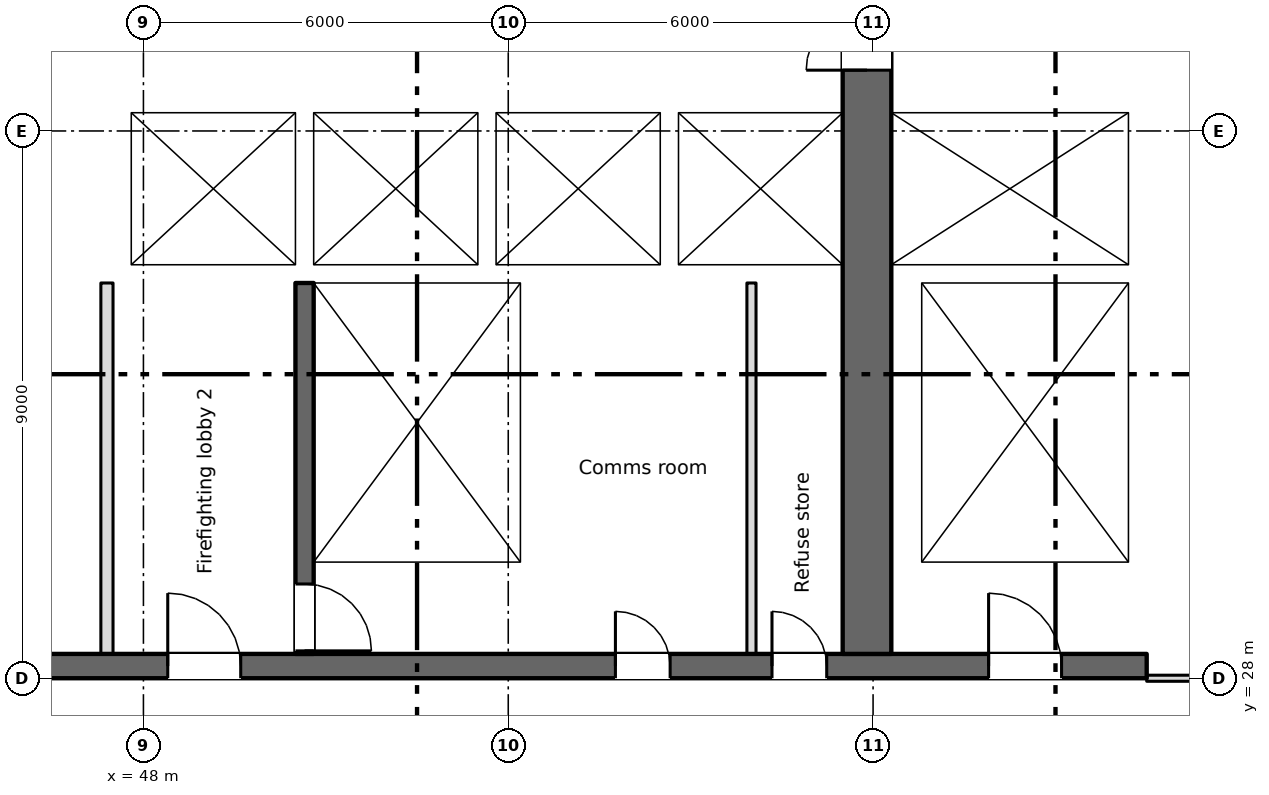
"""IFC4 building model, lengths in metres.
Left out: names, types, materials, properties, quantities, classifications, styles, units other than length and angle.
Written with IfcOpenShell. Run it as: python <this file> out.ifc"""

import sys

from ifc_helpers import new_model, si_unit, direction, frame, frame_2d, origin, place, context, subcontext, project, spatial, rectangle, extrude, element, fill, save


model = new_model("IFC4")
c1 = context("Model", 3, precision=1e-05, world=origin(), true_north=direction((0.0, 1.0)))
c2 = subcontext(c1, "Body", "Model", "MODEL_VIEW")
j1 = project(units=[si_unit("LENGTHUNIT", "METRE"), si_unit("PLANEANGLEUNIT", "RADIAN")], contexts=[c1])
p1 = place(None, origin())
s1 = spatial("IfcSite", under=j1, at=p1, CompositionType="ELEMENT")
p2 = place(p1, origin())
s2 = spatial("IfcBuilding", under=s1, at=p2, CompositionType="ELEMENT")
p3 = place(p2, frame((0.0, 0.0, 125.0)))
s3 = spatial("IfcBuildingStorey", under=s2, at=p3, CompositionType="ELEMENT", Elevation=125.0)
p4 = place(p3, frame((6.7, 28.2, 0.0), z_axis=(0.0, 0.0, 1.0), x_axis=(1.0, 0.0, 0.0)))
e1 = element("IfcWall", 1, at=p4, inside=s3, PredefinedType="SHEAR", context=c2, shape_type="SweptSolid", body=[
    extrude(rectangle(XDim=57.8, YDim=0.4, at=frame_2d((28.9, 0.0))), origin(), (0.0, 0.0, 1.0), 3.35),
])
p5 = place(p4, frame((12.062, 0.0, 0.0)))
e2 = element("IfcOpeningElement", 2, at=p5, cuts=e1, PredefinedType="OPENING", context=c2, shape_type="SweptSolid", body=[
    extrude(rectangle(XDim=0.9, YDim=2.1, at=frame_2d((0.45, 1.05))), frame((0.0, 0.21, 0.0), z_axis=(0.0, -1.0, 0.0), x_axis=(1.0, 0.0, 0.0)), (0.0, 0.0, 1.0), 0.42),
])
p6 = place(p4, frame((14.637, 0.0, 0.0)))
e3 = element("IfcOpeningElement", 3, at=p6, cuts=e1, PredefinedType="OPENING", context=c2, shape_type="SweptSolid", body=[
    extrude(rectangle(XDim=0.9, YDim=2.1, at=frame_2d((0.45, 1.05))), frame((0.0, 0.21, 0.0), z_axis=(0.0, -1.0, 0.0), x_axis=(1.0, 0.0, 0.0)), (0.0, 0.0, 1.0), 0.42),
])
p7 = place(p4, frame((49.062, 0.0, 0.0)))
e4 = element("IfcOpeningElement", 4, at=p7, cuts=e1, PredefinedType="OPENING", context=c2, shape_type="SweptSolid", body=[
    extrude(rectangle(XDim=0.9, YDim=2.1, at=frame_2d((0.45, 1.05))), frame((0.0, 0.21, 0.0), z_axis=(0.0, -1.0, 0.0), x_axis=(1.0, 0.0, 0.0)), (0.0, 0.0, 1.0), 0.42),
])
p8 = place(p4, frame((51.637, 0.0, 0.0)))
e5 = element("IfcOpeningElement", 5, at=p8, cuts=e1, PredefinedType="OPENING", context=c2, shape_type="SweptSolid", body=[
    extrude(rectangle(XDim=0.9, YDim=2.1, at=frame_2d((0.45, 1.05))), frame((0.0, 0.21, 0.0), z_axis=(0.0, -1.0, 0.0), x_axis=(1.0, 0.0, 0.0)), (0.0, 0.0, 1.0), 0.42),
])
p9 = place(p4, frame((1.35, 0.0, 0.0)))
e6 = element("IfcOpeningElement", 6, at=p9, cuts=e1, PredefinedType="OPENING", context=c2, shape_type="SweptSolid", body=[
    extrude(rectangle(XDim=0.9, YDim=2.1, at=frame_2d((0.45, 1.05))), frame((0.0, 0.21, 0.0), z_axis=(0.0, -1.0, 0.0), x_axis=(1.0, 0.0, 0.0)), (0.0, 0.0, 1.0), 0.42),
])
p10 = place(p4, frame((4.7, 0.0, 0.0)))
e7 = element("IfcOpeningElement", 7, at=p10, cuts=e1, PredefinedType="OPENING", context=c2, shape_type="SweptSolid", body=[
    extrude(rectangle(XDim=1.2, YDim=2.1, at=frame_2d((0.6, 1.05))), frame((0.0, 0.21, 0.0), z_axis=(0.0, -1.0, 0.0), x_axis=(1.0, 0.0, 0.0)), (0.0, 0.0, 1.0), 0.42),
])
p11 = place(p4, frame((31.7, 0.0, 0.0)))
e8 = element("IfcOpeningElement", 8, at=p11, cuts=e1, PredefinedType="OPENING", context=c2, shape_type="SweptSolid", body=[
    extrude(rectangle(XDim=1.2, YDim=2.1, at=frame_2d((0.6, 1.05))), frame((0.0, 0.21, 0.0), z_axis=(0.0, -1.0, 0.0), x_axis=(1.0, 0.0, 0.0)), (0.0, 0.0, 1.0), 0.42),
])
p12 = place(p4, frame((55.2, 0.0, 0.0)))
e9 = element("IfcOpeningElement", 9, at=p12, cuts=e1, PredefinedType="OPENING", context=c2, shape_type="SweptSolid", body=[
    extrude(rectangle(XDim=1.2, YDim=2.1, at=frame_2d((0.6, 1.05))), frame((0.0, 0.21, 0.0), z_axis=(0.0, -1.0, 0.0), x_axis=(1.0, 0.0, 0.0)), (0.0, 0.0, 1.0), 0.42),
])
p13 = place(p4, frame((21.7, 0.0, 0.0)))
e10 = element("IfcOpeningElement", 10, at=p13, cuts=e1, PredefinedType="OPENING", context=c2, shape_type="SweptSolid", body=[
    extrude(rectangle(XDim=1.2, YDim=2.1, at=frame_2d((0.6, 1.05))), frame((0.0, 0.21, 0.0), z_axis=(0.0, -1.0, 0.0), x_axis=(1.0, 0.0, 0.0)), (0.0, 0.0, 1.0), 0.42),
])
p14 = place(p4, frame((41.7, 0.0, 0.0)))
e11 = element("IfcOpeningElement", 11, at=p14, cuts=e1, PredefinedType="OPENING", context=c2, shape_type="SweptSolid", body=[
    extrude(rectangle(XDim=1.2, YDim=2.1, at=frame_2d((0.6, 1.05))), frame((0.0, 0.21, 0.0), z_axis=(0.0, -1.0, 0.0), x_axis=(1.0, 0.0, 0.0)), (0.0, 0.0, 1.0), 0.42),
])
p15 = place(p4, frame((24.85, 0.0, 0.0)))
e12 = element("IfcOpeningElement", 12, at=p15, cuts=e1, PredefinedType="OPENING", context=c2, shape_type="SweptSolid", body=[
    extrude(rectangle(XDim=2.4, YDim=2.1, at=frame_2d((1.2, 1.05))), frame((0.0, 0.21, 0.0), z_axis=(0.0, -1.0, 0.0), x_axis=(1.0, 0.0, 0.0)), (0.0, 0.0, 1.0), 0.42),
])
p16 = place(p4, frame((37.35, 0.0, 0.0)))
e13 = element("IfcOpeningElement", 13, at=p16, cuts=e1, PredefinedType="OPENING", context=c2, shape_type="SweptSolid", body=[
    extrude(rectangle(XDim=2.4, YDim=2.1, at=frame_2d((1.2, 1.05))), frame((0.0, 0.21, 0.0), z_axis=(0.0, -1.0, 0.0), x_axis=(1.0, 0.0, 0.0)), (0.0, 0.0, 1.0), 0.42),
])
p17 = place(p4, frame((7.95, 0.0, 0.0)))
e14 = element("IfcOpeningElement", 14, at=p17, cuts=e1, PredefinedType="OPENING", context=c2, shape_type="SweptSolid", body=[
    extrude(rectangle(XDim=2.4, YDim=2.1, at=frame_2d((1.2, 1.05))), frame((0.0, 0.21, 0.0), z_axis=(0.0, -1.0, 0.0), x_axis=(1.0, 0.0, 0.0)), (0.0, 0.0, 1.0), 0.42),
])
p18 = place(p4, frame((28.85, 0.0, 0.0)))
e15 = element("IfcOpeningElement", 15, at=p18, cuts=e1, PredefinedType="OPENING", context=c2, shape_type="SweptSolid", body=[
    extrude(rectangle(XDim=0.9, YDim=2.1, at=frame_2d((0.45, 1.05))), frame((0.0, 0.21, 0.0), z_axis=(0.0, -1.0, 0.0), x_axis=(1.0, 0.0, 0.0)), (0.0, 0.0, 1.0), 0.42),
])
p19 = place(p4, frame((34.85, 0.0, 0.0)))
e16 = element("IfcOpeningElement", 16, at=p19, cuts=e1, PredefinedType="OPENING", context=c2, shape_type="SweptSolid", body=[
    extrude(rectangle(XDim=0.9, YDim=2.1, at=frame_2d((0.45, 1.05))), frame((0.0, 0.21, 0.0), z_axis=(0.0, -1.0, 0.0), x_axis=(1.0, 0.0, 0.0)), (0.0, 0.0, 1.0), 0.42),
])
p20 = place(p3, frame((64.35, 34.8, 0.0), z_axis=(0.0, 0.0, 1.0), x_axis=(0.0, 1.0, 0.0)))
e17 = element("IfcWall", 17, at=p20, inside=s3, PredefinedType="SHEAR", context=c2, shape_type="SweptSolid", body=[
    extrude(rectangle(XDim=10.4, YDim=0.3, at=frame_2d((5.2, 0.0))), origin(), (0.0, 0.0, 1.0), 3.35),
])
p21 = place(p3, frame((59.9, 28.4, 0.0), z_axis=(0.0, 0.0, 1.0), x_axis=(0.0, 1.0, 0.0)))
e18 = element("IfcWall", 18, at=p21, inside=s3, PredefinedType="SHEAR", context=c2, shape_type="SweptSolid", body=[
    extrude(rectangle(XDim=16.8, YDim=0.8, at=frame_2d((8.4, 0.0))), origin(), (0.0, 0.0, 1.0), 3.35),
])
p22 = place(p21, frame((9.6, 0.0, 0.0)))
e19 = element("IfcOpeningElement", 19, at=p22, cuts=e18, PredefinedType="OPENING", context=c2, shape_type="SweptSolid", body=[
    extrude(rectangle(XDim=2.0, YDim=2.1, at=frame_2d((1.0, 1.05))), frame((0.0, 0.41, 0.0), z_axis=(0.0, -1.0, 0.0), x_axis=(1.0, 0.0, 0.0)), (0.0, 0.0, 1.0), 0.82),
])
p23 = place(p21, frame((15.35, 0.0, 0.0)))
e20 = element("IfcOpeningElement", 20, at=p23, cuts=e18, PredefinedType="OPENING", context=c2, shape_type="SweptSolid", body=[
    extrude(rectangle(XDim=1.2, YDim=2.1, at=frame_2d((0.6, 1.05))), frame((0.0, 0.41, 0.0), z_axis=(0.0, -1.0, 0.0), x_axis=(1.0, 0.0, 0.0)), (0.0, 0.0, 1.0), 0.82),
])
p24 = place(p3, frame((50.65, 34.5, 0.0), z_axis=(0.0, 0.0, 1.0), x_axis=(0.0, -1.0, 0.0)))
e21 = element("IfcWall", 21, at=p24, inside=s3, PredefinedType="SHEAR", context=c2, shape_type="SweptSolid", body=[
    extrude(rectangle(XDim=6.1, YDim=0.3, at=frame_2d((3.05, 0.0))), origin(), (0.0, 0.0, 1.0), 3.35),
])
p25 = place(p24, frame((4.95, 0.0, 0.0)))
e22 = element("IfcOpeningElement", 22, at=p25, cuts=e21, PredefinedType="OPENING", context=c2, shape_type="SweptSolid", body=[
    extrude(rectangle(XDim=1.1, YDim=2.1, at=frame_2d((0.55, 1.05))), frame((0.0, 0.16, 0.0), z_axis=(0.0, -1.0, 0.0), x_axis=(1.0, 0.0, 0.0)), (0.0, 0.0, 1.0), 0.32),
])
p26 = place(p3, frame((54.35, 28.4, 0.0), z_axis=(0.0, 0.0, 1.0), x_axis=(0.0, 1.0, 0.0)))
e23 = element("IfcWall", 23, at=p26, inside=s3, PredefinedType="SHEAR", context=c2, shape_type="SweptSolid", body=[
    extrude(rectangle(XDim=6.1, YDim=0.3, at=frame_2d((3.05, 0.0))), origin(), (0.0, 0.0, 1.0), 3.35),
])
p27 = place(p3, frame((60.55, 28.4, 0.0), z_axis=(0.0, 0.0, 1.0), x_axis=(0.0, 1.0, 0.0)))
e24 = element("IfcWall", 24, at=p27, inside=s3, PredefinedType="SHEAR", context=c2, shape_type="SweptSolid", body=[
    extrude(rectangle(XDim=6.1, YDim=0.5, at=frame_2d((3.05, 0.0))), origin(), (0.0, 0.0, 1.0), 3.35),
])
p28 = place(p3, frame((64.35, 28.4, 0.0), z_axis=(0.0, 0.0, 1.0), x_axis=(0.0, 1.0, 0.0)))
e25 = element("IfcWall", 25, at=p28, inside=s3, PredefinedType="SHEAR", context=c2, shape_type="SweptSolid", body=[
    extrude(rectangle(XDim=6.1, YDim=0.3, at=frame_2d((3.05, 0.0))), origin(), (0.0, 0.0, 1.0), 3.35),
])
p29 = place(p3, frame((47.3, 34.65, 0.0), z_axis=(0.0, 0.0, 1.0), x_axis=(1.0, 0.0, 0.0)))
e26 = element("IfcWall", 26, at=p29, inside=s3, PredefinedType="SHEAR", context=c2, shape_type="SweptSolid", body=[
    extrude(rectangle(XDim=12.2, YDim=0.3, at=frame_2d((6.1, 0.0))), origin(), (0.0, 0.0, 1.0), 3.35),
])
p30 = place(p29, frame((1.3, 0.0, 0.0)))
e27 = element("IfcOpeningElement", 27, at=p30, cuts=e26, PredefinedType="OPENING", context=c2, shape_type="SweptSolid", body=[
    extrude(rectangle(XDim=1.1, YDim=2.1, at=frame_2d((0.55, 1.05))), frame((0.0, 0.16, 0.0), z_axis=(0.0, -1.0, 0.0), x_axis=(1.0, 0.0, 0.0)), (0.0, 0.0, 1.0), 0.32),
])
p31 = place(p3, frame((60.3, 34.65, 0.0), z_axis=(0.0, 0.0, 1.0), x_axis=(1.0, 0.0, 0.0)))
e28 = element("IfcWall", 28, at=p31, inside=s3, PredefinedType="SHEAR", context=c2, shape_type="SweptSolid", body=[
    extrude(rectangle(XDim=4.2, YDim=0.3, at=frame_2d((2.1, 0.0))), origin(), (0.0, 0.0, 1.0), 3.35),
])
p32 = place(p3, frame((47.3, 37.45, 0.0), z_axis=(0.0, 0.0, 1.0), x_axis=(1.0, 0.0, 0.0)))
e29 = element("IfcWall", 29, at=p32, inside=s3, PredefinedType="SHEAR", context=c2, shape_type="SweptSolid", body=[
    extrude(rectangle(XDim=12.2, YDim=0.3, at=frame_2d((6.1, 0.0))), origin(), (0.0, 0.0, 1.0), 3.35),
])
p33 = place(p32, frame((4.3, 0.0, 0.0)))
e30 = element("IfcOpeningElement", 30, at=p33, cuts=e29, PredefinedType="OPENING", context=c2, shape_type="SweptSolid", body=[
    extrude(rectangle(XDim=1.1, YDim=2.1, at=frame_2d((0.55, 1.05))), frame((0.0, 0.16, 0.0), z_axis=(0.0, -1.0, 0.0), x_axis=(1.0, 0.0, 0.0)), (0.0, 0.0, 1.0), 0.32),
])
p34 = place(p32, frame((7.3, 0.0, 0.0)))
e31 = element("IfcOpeningElement", 31, at=p34, cuts=e29, PredefinedType="OPENING", context=c2, shape_type="SweptSolid", body=[
    extrude(rectangle(XDim=1.1, YDim=2.1, at=frame_2d((0.55, 1.05))), frame((0.0, 0.16, 0.0), z_axis=(0.0, -1.0, 0.0), x_axis=(1.0, 0.0, 0.0)), (0.0, 0.0, 1.0), 0.32),
])
p35 = place(p32, frame((10.3, 0.0, 0.0)))
e32 = element("IfcOpeningElement", 32, at=p35, cuts=e29, PredefinedType="OPENING", context=c2, shape_type="SweptSolid", body=[
    extrude(rectangle(XDim=1.1, YDim=2.1, at=frame_2d((0.55, 1.05))), frame((0.0, 0.16, 0.0), z_axis=(0.0, -1.0, 0.0), x_axis=(1.0, 0.0, 0.0)), (0.0, 0.0, 1.0), 0.32),
])
p36 = place(p3, frame((60.3, 37.45, 0.0), z_axis=(0.0, 0.0, 1.0), x_axis=(1.0, 0.0, 0.0)))
e33 = element("IfcWall", 33, at=p36, inside=s3, PredefinedType="SHEAR", context=c2, shape_type="SweptSolid", body=[
    extrude(rectangle(XDim=3.9, YDim=0.3, at=frame_2d((1.95, 0.0))), origin(), (0.0, 0.0, 1.0), 3.35),
])
p37 = place(p36, frame((1.4, 0.0, 0.0)))
e34 = element("IfcOpeningElement", 34, at=p37, cuts=e33, PredefinedType="OPENING", context=c2, shape_type="SweptSolid", body=[
    extrude(rectangle(XDim=1.1, YDim=2.1, at=frame_2d((0.55, 1.05))), frame((0.0, 0.16, 0.0), z_axis=(0.0, -1.0, 0.0), x_axis=(1.0, 0.0, 0.0)), (0.0, 0.0, 1.0), 0.32),
])
p38 = place(p3, frame((47.55, 34.8, 0.0), z_axis=(0.0, 0.0, 1.0), x_axis=(0.0, 1.0, 0.0)))
e35 = element("IfcWall", 35, at=p38, inside=s3, PredefinedType="SHEAR", context=c2, shape_type="SweptSolid", body=[
    extrude(rectangle(XDim=2.5, YDim=0.5, at=frame_2d((1.25, 0.0))), origin(), (0.0, 0.0, 1.0), 3.35),
])
for number, where, z_axis, x_axis in (
    (36, (50.65, 34.8, 0.0), (0.0, 0.0, 1.0), (0.0, 1.0, 0.0)),
    (37, (53.65, 34.8, 0.0), (0.0, 0.0, 1.0), (0.0, 1.0, 0.0)),
    (38, (56.65, 34.8, 0.0), (0.0, 0.0, 1.0), (0.0, 1.0, 0.0)),
):
    element("IfcWall", number, at=place(p3, frame(where, z_axis=z_axis, x_axis=x_axis)), inside=s3, PredefinedType="SHEAR", context=c2, shape_type="SweptSolid", body=[
        extrude(rectangle(XDim=2.5, YDim=0.3, at=frame_2d((1.25, 0.0))), origin(), (0.0, 0.0, 1.0), 3.35),
    ])
p39 = place(p3, frame((47.4, 28.4, 0.0), z_axis=(0.0, 0.0, 1.0), x_axis=(0.0, 1.0, 0.0)))
e39 = element("IfcWall", 39, at=p39, inside=s3, PredefinedType="PARTITIONING", context=c2, shape_type="SweptSolid", body=[
    extrude(rectangle(XDim=6.1, YDim=0.2, at=frame_2d((3.05, 0.0))), origin(), (0.0, 0.0, 1.0), 3.35),
])
p40 = place(p3, frame((58.0, 28.4, 0.0), z_axis=(0.0, 0.0, 1.0), x_axis=(0.0, 1.0, 0.0)))
e40 = element("IfcWall", 40, at=p40, inside=s3, PredefinedType="PARTITIONING", context=c2, shape_type="SweptSolid", body=[
    extrude(rectangle(XDim=6.1, YDim=0.15, at=frame_2d((3.05, 0.0))), origin(), (0.0, 0.0, 1.0), 3.35),
])
p41 = place(p3, frame((64.5, 28.0, 0.0), z_axis=(0.0, 0.0, 1.0), x_axis=(1.0, 0.0, 0.0)))
e41 = element("IfcWall", 41, at=p41, inside=s3, PredefinedType="PARTITIONING", context=c2, shape_type="SweptSolid", body=[
    extrude(rectangle(XDim=6.8, YDim=0.1, at=frame_2d((3.4, 0.0))), origin(), (0.0, 0.0, 1.0), 3.35),
])
p42 = place(p41, frame((2.5, 0.0, 0.0)))
e42 = element("IfcOpeningElement", 42, at=p42, cuts=e41, PredefinedType="OPENING", context=c2, shape_type="SweptSolid", body=[
    extrude(rectangle(XDim=1.8, YDim=2.1, at=frame_2d((0.9, 1.05))), frame((0.0, 0.06, 0.0), z_axis=(0.0, -1.0, 0.0), x_axis=(1.0, 0.0, 0.0)), (0.0, 0.0, 1.0), 0.12),
])
p43 = place(p7, origin())
e43 = element("IfcDoor", 43, at=p43, inside=s3, OperationType="SINGLE_SWING_LEFT", PredefinedType="DOOR", context=c2, shape_type="SweptSolid", body=[
    extrude(rectangle(XDim=0.9, YDim=2.1, at=frame_2d((0.45, 1.05))), frame((0.0, 0.025, 0.0), z_axis=(0.0, -1.0, 0.0), x_axis=(1.0, 0.0, 0.0)), (0.0, 0.0, 1.0), 0.05),
])
fill(e4, e43)
p44 = place(p8, origin())
e44 = element("IfcDoor", 44, at=p44, inside=s3, OperationType="SINGLE_SWING_LEFT", PredefinedType="DOOR", context=c2, shape_type="SweptSolid", body=[
    extrude(rectangle(XDim=0.9, YDim=2.1, at=frame_2d((0.45, 1.05))), frame((0.0, 0.025, 0.0), z_axis=(0.0, -1.0, 0.0), x_axis=(1.0, 0.0, 0.0)), (0.0, 0.0, 1.0), 0.05),
])
fill(e5, e44)
p45 = place(p33, origin())
e45 = element("IfcDoor", 45, at=p45, inside=s3, OperationType="SLIDING_TO_LEFT", PredefinedType="DOOR", context=c2, shape_type="SweptSolid", body=[
    extrude(rectangle(XDim=1.1, YDim=2.1, at=frame_2d((0.55, 1.05))), frame((0.0, 0.025, 0.0), z_axis=(0.0, -1.0, 0.0), x_axis=(1.0, 0.0, 0.0)), (0.0, 0.0, 1.0), 0.05),
])
fill(e30, e45)
p46 = place(p34, origin())
e46 = element("IfcDoor", 46, at=p46, inside=s3, OperationType="SLIDING_TO_LEFT", PredefinedType="DOOR", context=c2, shape_type="SweptSolid", body=[
    extrude(rectangle(XDim=1.1, YDim=2.1, at=frame_2d((0.55, 1.05))), frame((0.0, 0.025, 0.0), z_axis=(0.0, -1.0, 0.0), x_axis=(1.0, 0.0, 0.0)), (0.0, 0.0, 1.0), 0.05),
])
fill(e31, e46)
p47 = place(p35, origin())
e47 = element("IfcDoor", 47, at=p47, inside=s3, OperationType="SLIDING_TO_LEFT", PredefinedType="DOOR", context=c2, shape_type="SweptSolid", body=[
    extrude(rectangle(XDim=1.1, YDim=2.1, at=frame_2d((0.55, 1.05))), frame((0.0, 0.025, 0.0), z_axis=(0.0, -1.0, 0.0), x_axis=(1.0, 0.0, 0.0)), (0.0, 0.0, 1.0), 0.05),
])
fill(e32, e47)
p48 = place(p37, origin())
e48 = element("IfcDoor", 48, at=p48, inside=s3, OperationType="SLIDING_TO_LEFT", PredefinedType="DOOR", context=c2, shape_type="SweptSolid", body=[
    extrude(rectangle(XDim=1.1, YDim=2.1, at=frame_2d((0.55, 1.05))), frame((0.0, 0.025, 0.0), z_axis=(0.0, -1.0, 0.0), x_axis=(1.0, 0.0, 0.0)), (0.0, 0.0, 1.0), 0.05),
])
fill(e34, e48)
p49 = place(p30, origin())
e49 = element("IfcDoor", 49, at=p49, inside=s3, OperationType="SLIDING_TO_LEFT", PredefinedType="DOOR", context=c2, shape_type="SweptSolid", body=[
    extrude(rectangle(XDim=1.1, YDim=2.1, at=frame_2d((0.55, 1.05))), frame((0.0, 0.025, 0.0), z_axis=(0.0, -1.0, 0.0), x_axis=(1.0, 0.0, 0.0)), (0.0, 0.0, 1.0), 0.05),
])
fill(e27, e49)
p50 = place(p25, origin())
e50 = element("IfcDoor", 50, at=p50, inside=s3, OperationType="SINGLE_SWING_RIGHT", PredefinedType="DOOR", context=c2, shape_type="SweptSolid", body=[
    extrude(rectangle(XDim=1.1, YDim=2.1, at=frame_2d((0.55, 1.05))), frame((0.0, 0.025, 0.0), z_axis=(0.0, -1.0, 0.0), x_axis=(1.0, 0.0, 0.0)), (0.0, 0.0, 1.0), 0.05),
])
fill(e22, e50)
p51 = place(p12, origin())
e51 = element("IfcDoor", 51, at=p51, inside=s3, OperationType="SINGLE_SWING_LEFT", PredefinedType="DOOR", context=c2, shape_type="SweptSolid", body=[
    extrude(rectangle(XDim=1.2, YDim=2.1, at=frame_2d((0.6, 1.05))), frame((0.0, 0.025, 0.0), z_axis=(0.0, -1.0, 0.0), x_axis=(1.0, 0.0, 0.0)), (0.0, 0.0, 1.0), 0.05),
])
fill(e9, e51)
p52 = place(p14, origin())
e52 = element("IfcDoor", 52, at=p52, inside=s3, OperationType="SINGLE_SWING_LEFT", PredefinedType="DOOR", context=c2, shape_type="SweptSolid", body=[
    extrude(rectangle(XDim=1.2, YDim=2.1, at=frame_2d((0.6, 1.05))), frame((0.0, 0.025, 0.0), z_axis=(0.0, -1.0, 0.0), x_axis=(1.0, 0.0, 0.0)), (0.0, 0.0, 1.0), 0.05),
])
fill(e11, e52)
p53 = place(p22, origin())
e53 = element("IfcDoor", 53, at=p53, inside=s3, OperationType="DOUBLE_DOOR_SINGLE_SWING", PredefinedType="DOOR", context=c2, shape_type="SweptSolid", body=[
    extrude(rectangle(XDim=2.0, YDim=2.1, at=frame_2d((1.0, 1.05))), frame((0.0, 0.025, 0.0), z_axis=(0.0, -1.0, 0.0), x_axis=(1.0, 0.0, 0.0)), (0.0, 0.0, 1.0), 0.05),
])
fill(e19, e53)
save(model, sys.argv[1])
